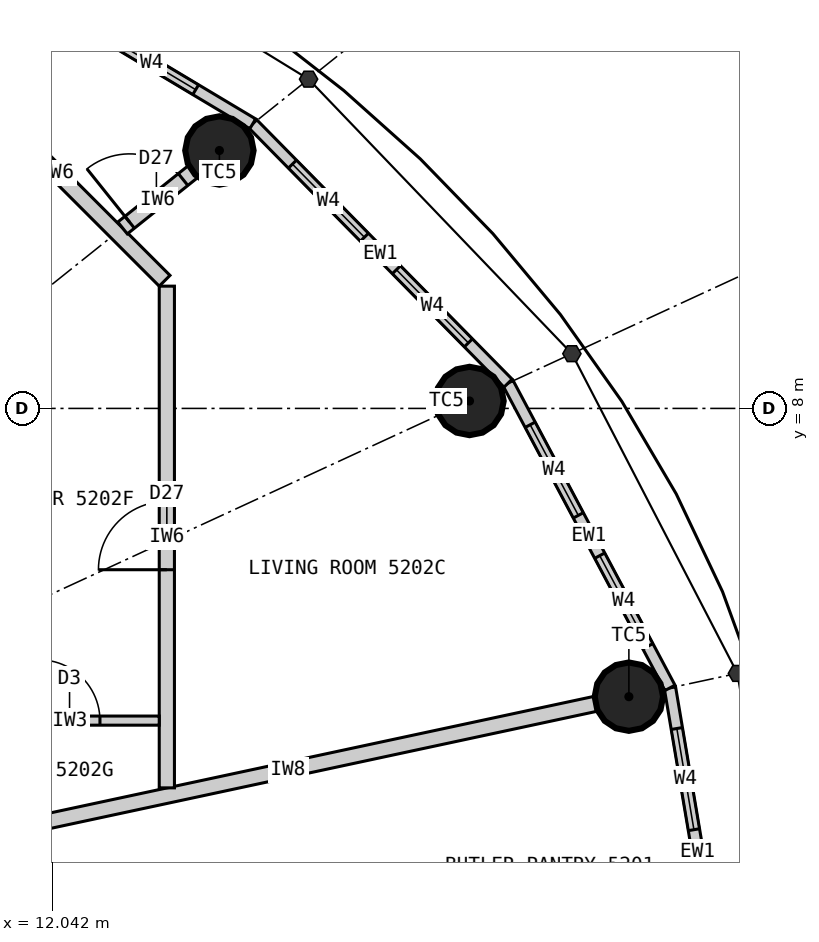
"""IFC4 building model, lengths in metres.
Left out: names, types, materials, properties, quantities, classifications, styles, units other than length and angle.
Written with IfcOpenShell. Run it as: python <this file> out.ifc"""

import sys

from ifc_helpers import new_model, si_unit, direction, frame, frame_2d, origin, origin_2d, place, context, subcontext, project, spatial, rectangle, circle, extrude, element, fill, save


model = new_model("IFC4")
c1 = context("Model", 3, precision=1e-05, world=origin(), true_north=direction((0.0, 1.0)))
c2 = subcontext(c1, "Body", "Model", "MODEL_VIEW")
j1 = project(units=[si_unit("LENGTHUNIT", "METRE"), si_unit("PLANEANGLEUNIT", "RADIAN")], contexts=[c1])
p1 = place(None, origin())
s1 = spatial("IfcSite", under=j1, at=p1, CompositionType="ELEMENT")
p2 = place(p1, origin())
s2 = spatial("IfcBuilding", under=s1, at=p2, CompositionType="ELEMENT")
p3 = place(p2, frame((0.0, 0.0, 196.2)))
s3 = spatial("IfcBuildingStorey", under=s2, at=p3, CompositionType="ELEMENT", Elevation=196.2)
for number, where, z_axis, x_axis in (
    (1, (19.629, 4.208, 0.0), (0.0, 0.0, 1.0), (1.0, 0.0, 0.0)),
    (2, (17.532, 8.098, 0.0), (0.0, 0.0, 1.0), (1.0, 0.0, 0.0)),
    (3, (14.241, 11.393, 0.0), (0.0, 0.0, 1.0), (1.0, 0.0, 0.0)),
):
    element("IfcColumn", number, at=place(p3, frame(where, z_axis=z_axis, x_axis=x_axis)), inside=s3, PredefinedType="COLUMN", context=c2, shape_type="SweptSolid", body=[
        extrude(circle(Radius=0.45, at=origin_2d()), origin(), (0.0, 0.0, 1.0), 3.3),
    ])
p4 = place(p3, frame((20.9, 0.0, 0.0), z_axis=(0.0, 0.0, 1.0), x_axis=(-0.166538513568, 0.986034950445, 0.0)))
e4 = element("IfcWall", 4, at=p4, inside=s3, PredefinedType="ELEMENTEDWALL", context=c2, shape_type="SweptSolid", body=[
    extrude(rectangle(XDim=4.385, YDim=0.15, at=frame_2d((2.192, 0.0))), origin(), (0.0, 0.0, 1.0), 3.12),
])
p5 = place(p4, frame((0.542, 0.0, 0.9)))
e5 = element("IfcOpeningElement", 5, at=p5, cuts=e4, PredefinedType="OPENING", context=c2, shape_type="SweptSolid", body=[
    extrude(rectangle(XDim=1.35, YDim=1.9, at=frame_2d((0.675, 0.95))), frame((0.0, 0.085, 0.0), z_axis=(0.0, -1.0, 0.0), x_axis=(1.0, 0.0, 0.0)), (0.0, 0.0, 1.0), 0.17),
])
p6 = place(p4, frame((2.492, 0.0, 0.9)))
e6 = element("IfcOpeningElement", 6, at=p6, cuts=e4, PredefinedType="OPENING", context=c2, shape_type="SweptSolid", body=[
    extrude(rectangle(XDim=1.35, YDim=1.9, at=frame_2d((0.675, 0.95))), frame((0.0, 0.085, 0.0), z_axis=(0.0, -1.0, 0.0), x_axis=(1.0, 0.0, 0.0)), (0.0, 0.0, 1.0), 0.17),
])
p7 = place(p3, frame((20.17, 4.323, 0.0), z_axis=(0.0, 0.0, 1.0), x_axis=(-0.469256152955, 0.883062094597, 0.0)))
e7 = element("IfcWall", 7, at=p7, inside=s3, PredefinedType="ELEMENTEDWALL", context=c2, shape_type="SweptSolid", body=[
    extrude(rectangle(XDim=4.539, YDim=0.15, at=frame_2d((2.27, 0.0))), origin(), (0.0, 0.0, 1.0), 3.12),
])
p8 = place(p7, frame((0.62, 0.0, 0.9)))
e8 = element("IfcOpeningElement", 8, at=p8, cuts=e7, PredefinedType="OPENING", context=c2, shape_type="SweptSolid", body=[
    extrude(rectangle(XDim=1.35, YDim=1.9, at=frame_2d((0.675, 0.95))), frame((0.0, 0.085, 0.0), z_axis=(0.0, -1.0, 0.0), x_axis=(1.0, 0.0, 0.0)), (0.0, 0.0, 1.0), 0.17),
])
p9 = place(p7, frame((2.57, 0.0, 0.9)))
e9 = element("IfcOpeningElement", 9, at=p9, cuts=e7, PredefinedType="OPENING", context=c2, shape_type="SweptSolid", body=[
    extrude(rectangle(XDim=1.35, YDim=1.9, at=frame_2d((0.675, 0.95))), frame((0.0, 0.085, 0.0), z_axis=(0.0, -1.0, 0.0), x_axis=(1.0, 0.0, 0.0)), (0.0, 0.0, 1.0), 0.17),
])
p10 = place(p3, frame((18.04, 8.332, 0.0), z_axis=(0.0, 0.0, 1.0), x_axis=(-0.701527379618, 0.712642501993, 0.0)))
e10 = element("IfcWall", 10, at=p10, inside=s3, PredefinedType="ELEMENTEDWALL", context=c2, shape_type="SweptSolid", body=[
    extrude(rectangle(XDim=4.788, YDim=0.15, at=frame_2d((2.394, 0.0))), origin(), (0.0, 0.0, 1.0), 3.12),
])
p11 = place(p10, frame((0.744, 0.0, 0.9)))
e11 = element("IfcOpeningElement", 11, at=p11, cuts=e10, PredefinedType="OPENING", context=c2, shape_type="SweptSolid", body=[
    extrude(rectangle(XDim=1.35, YDim=1.9, at=frame_2d((0.675, 0.95))), frame((0.0, 0.085, 0.0), z_axis=(0.0, -1.0, 0.0), x_axis=(1.0, 0.0, 0.0)), (0.0, 0.0, 1.0), 0.17),
])
p12 = place(p10, frame((2.694, 0.0, 0.9)))
e12 = element("IfcOpeningElement", 12, at=p12, cuts=e10, PredefinedType="OPENING", context=c2, shape_type="SweptSolid", body=[
    extrude(rectangle(XDim=1.35, YDim=1.9, at=frame_2d((0.675, 0.95))), frame((0.0, 0.085, 0.0), z_axis=(0.0, -1.0, 0.0), x_axis=(1.0, 0.0, 0.0)), (0.0, 0.0, 1.0), 0.17),
])
p13 = place(p3, frame((14.68, 11.744, 0.0), z_axis=(0.0, 0.0, 1.0), x_axis=(-0.85822150553, 0.513279502265, 0.0)))
e13 = element("IfcWall", 13, at=p13, inside=s3, PredefinedType="ELEMENTEDWALL", context=c2, shape_type="SweptSolid", body=[
    extrude(rectangle(XDim=5.05, YDim=0.15, at=frame_2d((2.525, 0.0))), origin(), (0.0, 0.0, 1.0), 3.12),
])
p14 = place(p13, frame((0.875, 0.0, 0.9)))
e14 = element("IfcOpeningElement", 14, at=p14, cuts=e13, PredefinedType="OPENING", context=c2, shape_type="SweptSolid", body=[
    extrude(rectangle(XDim=1.35, YDim=1.9, at=frame_2d((0.675, 0.95))), frame((0.0, 0.085, 0.0), z_axis=(0.0, -1.0, 0.0), x_axis=(1.0, 0.0, 0.0)), (0.0, 0.0, 1.0), 0.17),
])
p15 = place(p13, frame((2.825, 0.0, 0.9)))
e15 = element("IfcOpeningElement", 15, at=p15, cuts=e13, PredefinedType="OPENING", context=c2, shape_type="SweptSolid", body=[
    extrude(rectangle(XDim=1.35, YDim=1.9, at=frame_2d((0.675, 0.95))), frame((0.0, 0.085, 0.0), z_axis=(0.0, -1.0, 0.0), x_axis=(1.0, 0.0, 0.0)), (0.0, 0.0, 1.0), 0.17),
])
p16 = place(p3, frame((11.1, 2.379, 0.0), z_axis=(0.0, 0.0, 1.0), x_axis=(0.977789888126, 0.209587534647, 0.0)))
e16 = element("IfcWall", 16, at=p16, inside=s3, PredefinedType="PARTITIONING", context=c2, shape_type="SweptSolid", body=[
    extrude(rectangle(XDim=8.273, YDim=0.2, at=frame_2d((4.136, 0.0))), origin(), (0.0, 0.0, 1.0), 2.42),
])
p17 = place(p3, frame((13.55, 3.008, 0.0), z_axis=(0.0, 0.0, 1.0), x_axis=(0.0, 1.0, 0.0)))
e17 = element("IfcWall", 17, at=p17, inside=s3, PredefinedType="PARTITIONING", context=c2, shape_type="SweptSolid", body=[
    extrude(rectangle(XDim=6.601, YDim=0.2, at=frame_2d((3.3, 0.0))), origin(), (0.0, 0.0, 1.0), 3.12),
])
p18 = place(p17, frame((2.87, 0.0, 0.0)))
e18 = element("IfcOpeningElement", 18, at=p18, cuts=e17, PredefinedType="OPENING", context=c2, shape_type="SweptSolid", body=[
    extrude(rectangle(XDim=0.9, YDim=2.1, at=frame_2d((0.45, 1.05))), frame((0.0, 0.11, 0.0), z_axis=(0.0, -1.0, 0.0), x_axis=(1.0, 0.0, 0.0)), (0.0, 0.0, 1.0), 0.22),
])
p19 = place(p3, frame((13.521, 9.679, 0.0), z_axis=(0.0, 0.0, 1.0), x_axis=(-0.707106781187, 0.707106781187, 0.0)))
e19 = element("IfcWall", 19, at=p19, inside=s3, PredefinedType="PARTITIONING", context=c2, shape_type="SweptSolid", body=[
    extrude(rectangle(XDim=4.019, YDim=0.2, at=frame_2d((2.009, 0.0))), origin(), (0.0, 0.0, 1.0), 3.12),
])
p20 = place(p3, frame((12.968, 10.374, 0.0), z_axis=(0.0, 0.0, 1.0), x_axis=(0.780888968944, 0.624669847345, 0.0)))
e20 = element("IfcWall", 20, at=p20, inside=s3, PredefinedType="PARTITIONING", context=c2, shape_type="SweptSolid", body=[
    extrude(rectangle(XDim=1.181, YDim=0.2, at=frame_2d((0.591, 0.0))), origin(), (0.0, 0.0, 1.0), 2.42),
])
p21 = place(p20, frame((0.12, 0.0, 0.0)))
e21 = element("IfcOpeningElement", 21, at=p21, cuts=e20, PredefinedType="OPENING", context=c2, shape_type="SweptSolid", body=[
    extrude(rectangle(XDim=0.9, YDim=2.1, at=frame_2d((0.45, 1.05))), frame((0.0, 0.11, 0.0), z_axis=(0.0, -1.0, 0.0), x_axis=(1.0, 0.0, 0.0)), (0.0, 0.0, 1.0), 0.22),
])
p22 = place(p3, frame((11.1, 3.893, 0.0), z_axis=(0.0, 0.0, 1.0), x_axis=(1.0, 0.0, 0.0)))
e22 = element("IfcWall", 22, at=p22, inside=s3, PredefinedType="PARTITIONING", context=c2, shape_type="SweptSolid", body=[
    extrude(rectangle(XDim=2.35, YDim=0.12, at=frame_2d((1.175, 0.0))), origin(), (0.0, 0.0, 1.0), 3.12),
])
p23 = place(p22, frame((0.77, 0.0, 0.0)))
e23 = element("IfcOpeningElement", 23, at=p23, cuts=e22, PredefinedType="OPENING", context=c2, shape_type="SweptSolid", body=[
    extrude(rectangle(XDim=0.8, YDim=2.1, at=frame_2d((0.4, 1.05))), frame((0.0, 0.07, 0.0), z_axis=(0.0, -1.0, 0.0), x_axis=(1.0, 0.0, 0.0)), (0.0, 0.0, 1.0), 0.14),
])
p24 = place(p6, origin())
e24 = element("IfcWindow", 24, at=p24, inside=s3, PartitioningType="SINGLE_PANEL", PredefinedType="WINDOW", context=c2, shape_type="SweptSolid", body=[
    extrude(rectangle(XDim=1.35, YDim=1.9, at=frame_2d((0.675, 0.95))), frame((0.0, 0.03, 0.0), z_axis=(0.0, -1.0, 0.0), x_axis=(1.0, 0.0, 0.0)), (0.0, 0.0, 1.0), 0.06),
])
fill(e6, e24)
p25 = place(p8, origin())
e25 = element("IfcWindow", 25, at=p25, inside=s3, PartitioningType="SINGLE_PANEL", PredefinedType="WINDOW", context=c2, shape_type="SweptSolid", body=[
    extrude(rectangle(XDim=1.35, YDim=1.9, at=frame_2d((0.675, 0.95))), frame((0.0, 0.03, 0.0), z_axis=(0.0, -1.0, 0.0), x_axis=(1.0, 0.0, 0.0)), (0.0, 0.0, 1.0), 0.06),
])
fill(e8, e25)
p26 = place(p9, origin())
e26 = element("IfcWindow", 26, at=p26, inside=s3, PartitioningType="SINGLE_PANEL", PredefinedType="WINDOW", context=c2, shape_type="SweptSolid", body=[
    extrude(rectangle(XDim=1.35, YDim=1.9, at=frame_2d((0.675, 0.95))), frame((0.0, 0.03, 0.0), z_axis=(0.0, -1.0, 0.0), x_axis=(1.0, 0.0, 0.0)), (0.0, 0.0, 1.0), 0.06),
])
fill(e9, e26)
p27 = place(p11, origin())
e27 = element("IfcWindow", 27, at=p27, inside=s3, PartitioningType="SINGLE_PANEL", PredefinedType="WINDOW", context=c2, shape_type="SweptSolid", body=[
    extrude(rectangle(XDim=1.35, YDim=1.9, at=frame_2d((0.675, 0.95))), frame((0.0, 0.03, 0.0), z_axis=(0.0, -1.0, 0.0), x_axis=(1.0, 0.0, 0.0)), (0.0, 0.0, 1.0), 0.06),
])
fill(e11, e27)
p28 = place(p12, origin())
e28 = element("IfcWindow", 28, at=p28, inside=s3, PartitioningType="SINGLE_PANEL", PredefinedType="WINDOW", context=c2, shape_type="SweptSolid", body=[
    extrude(rectangle(XDim=1.35, YDim=1.9, at=frame_2d((0.675, 0.95))), frame((0.0, 0.03, 0.0), z_axis=(0.0, -1.0, 0.0), x_axis=(1.0, 0.0, 0.0)), (0.0, 0.0, 1.0), 0.06),
])
fill(e12, e28)
p29 = place(p14, origin())
e29 = element("IfcWindow", 29, at=p29, inside=s3, PartitioningType="SINGLE_PANEL", PredefinedType="WINDOW", context=c2, shape_type="SweptSolid", body=[
    extrude(rectangle(XDim=1.35, YDim=1.9, at=frame_2d((0.675, 0.95))), frame((0.0, 0.03, 0.0), z_axis=(0.0, -1.0, 0.0), x_axis=(1.0, 0.0, 0.0)), (0.0, 0.0, 1.0), 0.06),
])
fill(e14, e29)
p30 = place(p23, origin())
e30 = element("IfcDoor", 30, at=p30, inside=s3, OperationType="SINGLE_SWING_LEFT", PredefinedType="DOOR", context=c2, shape_type="SweptSolid", body=[
    extrude(rectangle(XDim=0.8, YDim=2.1, at=frame_2d((0.4, 1.05))), frame((0.0, 0.025, 0.0), z_axis=(0.0, -1.0, 0.0), x_axis=(1.0, 0.0, 0.0)), (0.0, 0.0, 1.0), 0.05),
])
fill(e23, e30)
p31 = place(p18, origin())
e31 = element("IfcDoor", 31, at=p31, inside=s3, OperationType="SINGLE_SWING_LEFT", PredefinedType="DOOR", context=c2, shape_type="SweptSolid", body=[
    extrude(rectangle(XDim=0.9, YDim=2.1, at=frame_2d((0.45, 1.05))), frame((0.0, 0.025, 0.0), z_axis=(0.0, -1.0, 0.0), x_axis=(1.0, 0.0, 0.0)), (0.0, 0.0, 1.0), 0.05),
])
fill(e18, e31)
p32 = place(p21, origin())
e32 = element("IfcDoor", 32, at=p32, inside=s3, OperationType="SINGLE_SWING_LEFT", PredefinedType="DOOR", context=c2, shape_type="SweptSolid", body=[
    extrude(rectangle(XDim=0.9, YDim=2.1, at=frame_2d((0.45, 1.05))), frame((0.0, 0.025, 0.0), z_axis=(0.0, -1.0, 0.0), x_axis=(1.0, 0.0, 0.0)), (0.0, 0.0, 1.0), 0.05),
])
fill(e21, e32)
save(model, sys.argv[1])
